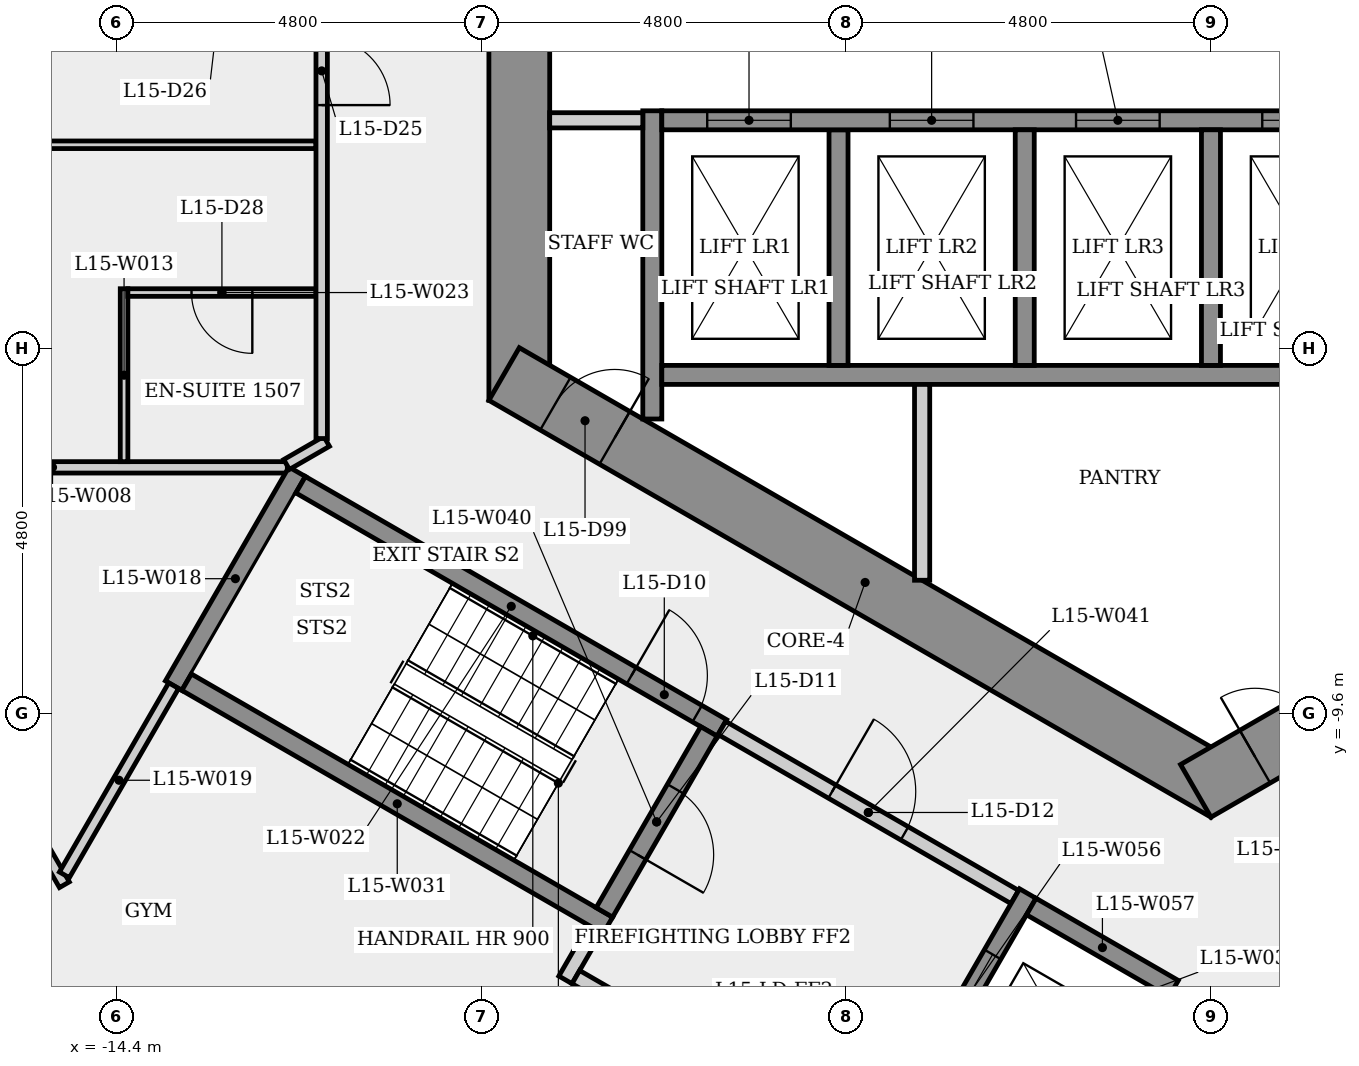
"""IFC4 building model, lengths in metres.
Left out: names, types, materials, properties, quantities, classifications, styles, units other than length and angle.
Written with IfcOpenShell. Run it as: python <this file> out.ifc"""

import sys

from ifc_helpers import new_model, si_unit, direction, frame, frame_2d, origin, place, context, subcontext, project, spatial, rectangle, extrude, element, fill, save


model = new_model("IFC4")
c1 = context("Model", 3, precision=1e-05, world=origin(), true_north=direction((0.0, 1.0)))
c2 = subcontext(c1, "Body", "Model", "MODEL_VIEW")
j1 = project(units=[si_unit("LENGTHUNIT", "METRE"), si_unit("PLANEANGLEUNIT", "RADIAN")], contexts=[c1])
p1 = place(None, origin())
s1 = spatial("IfcSite", under=j1, at=p1, CompositionType="ELEMENT")
p2 = place(p1, origin())
s2 = spatial("IfcBuilding", under=s1, at=p2, CompositionType="ELEMENT")
p3 = place(p2, frame((0.0, 0.0, 59.5)))
s3 = spatial("IfcBuildingStorey", under=s2, at=p3, CompositionType="ELEMENT", Elevation=59.5)
p4 = place(p3, frame((-9.1, 5.485, 0.0), z_axis=(0.0, 0.0, 1.0), x_axis=(0.0, -1.0, 0.0)))
e1 = element("IfcWall", 1, at=p4, inside=s3, PredefinedType="SHEAR", context=c2, shape_type="SweptSolid", body=[
    extrude(rectangle(XDim=10.97, YDim=0.8, at=frame_2d((5.485, 0.0))), origin(), (0.0, 0.0, 1.0), 3.4),
])
p5 = place(p4, frame((4.685, 0.0, 0.0)))
e2 = element("IfcOpeningElement", 2, at=p5, cuts=e1, PredefinedType="OPENING", context=c2, shape_type="SweptSolid", body=[
    extrude(rectangle(XDim=1.6, YDim=2.1, at=frame_2d((0.8, 1.05))), frame((0.0, 0.41, 0.0), z_axis=(0.0, -1.0, 0.0), x_axis=(1.0, 0.0, 0.0)), (0.0, 0.0, 1.0), 0.82),
])
p6 = place(p3, frame((-9.3, -5.138, 0.0), z_axis=(0.0, 0.0, 1.0), x_axis=(0.866023993627, -0.500002442456, 0.0)))
e3 = element("IfcWall", 3, at=p6, inside=s3, PredefinedType="SHEAR", context=c2, shape_type="SweptSolid", body=[
    extrude(rectangle(XDim=10.97, YDim=0.8, at=frame_2d((5.485, 0.0))), origin(), (0.0, 0.0, 1.0), 3.4),
])
p7 = place(p6, frame((0.78, 0.0, 0.0)))
e4 = element("IfcOpeningElement", 4, at=p7, cuts=e3, PredefinedType="OPENING", context=c2, shape_type="SweptSolid", body=[
    extrude(rectangle(XDim=0.9, YDim=2.1, at=frame_2d((0.45, 1.05))), frame((0.0, 0.41, 0.0), z_axis=(0.0, -1.0, 0.0), x_axis=(1.0, 0.0, 0.0)), (0.0, 0.0, 1.0), 0.82),
])
p8 = place(p3, frame((-0.2, -10.623, 0.0), z_axis=(0.0, 0.0, 1.0), x_axis=(0.866023993627, 0.500002442456, 0.0)))
e5 = element("IfcWall", 5, at=p8, inside=s3, PredefinedType="SHEAR", context=c2, shape_type="SweptSolid", body=[
    extrude(rectangle(XDim=10.97, YDim=0.8, at=frame_2d((5.485, 0.0))), origin(), (0.0, 0.0, 1.0), 3.4),
])
p9 = place(p8, frame((0.9, 0.0, 0.0)))
e6 = element("IfcOpeningElement", 6, at=p9, cuts=e5, PredefinedType="OPENING", context=c2, shape_type="SweptSolid", body=[
    extrude(rectangle(XDim=0.9, YDim=2.1, at=frame_2d((0.45, 1.05))), frame((0.0, 0.41, 0.0), z_axis=(0.0, -1.0, 0.0), x_axis=(1.0, 0.0, 0.0)), (0.0, 0.0, 1.0), 0.82),
])
p10 = place(p8, frame((7.455, 0.0, 0.0)))
e7 = element("IfcOpeningElement", 7, at=p10, cuts=e5, PredefinedType="OPENING", context=c2, shape_type="SweptSolid", body=[
    extrude(rectangle(XDim=0.9, YDim=2.1, at=frame_2d((0.45, 1.05))), frame((0.0, 0.41, 0.0), z_axis=(0.0, -1.0, 0.0), x_axis=(1.0, 0.0, 0.0)), (0.0, 0.0, 1.0), 0.82),
])
p11 = place(p3, frame((-18.331, -6.366, 0.0), z_axis=(0.0, 0.0, 1.0), x_axis=(1.0, 0.0, 0.0)))
e8 = element("IfcWall", 8, at=p11, inside=s3, PredefinedType="PARTITIONING", context=c2, shape_type="SweptSolid", body=[
    extrude(rectangle(XDim=6.179, YDim=0.15, at=frame_2d((3.089, 0.0))), origin(), (0.0, 0.0, 1.0), 3.05),
])
p12 = place(p11, frame((1.605, 0.0, 0.0)))
e9 = element("IfcOpeningElement", 9, at=p12, cuts=e8, PredefinedType="OPENING", context=c2, shape_type="SweptSolid", body=[
    extrude(rectangle(XDim=0.9, YDim=2.1, at=frame_2d((0.45, 1.05))), frame((0.0, 0.085, 0.0), z_axis=(0.0, -1.0, 0.0), x_axis=(1.0, 0.0, 0.0)), (0.0, 0.0, 1.0), 0.17),
])
p13 = place(p3, frame((-15.085, -11.858, 0.0), z_axis=(0.0, 0.0, 1.0), x_axis=(-0.500019233215, 0.866014299198, 0.0)))
e10 = element("IfcWall", 10, at=p13, inside=s3, PredefinedType="PARTITIONING", context=c2, shape_type="SweptSolid", body=[
    extrude(rectangle(XDim=6.266, YDim=0.15, at=frame_2d((3.133, 0.0))), origin(), (0.0, 0.0, 1.0), 3.05),
])
p14 = place(p13, frame((2.671, 0.0, 0.0)))
e11 = element("IfcOpeningElement", 11, at=p14, cuts=e10, PredefinedType="OPENING", context=c2, shape_type="SweptSolid", body=[
    extrude(rectangle(XDim=1.0, YDim=2.1, at=frame_2d((0.5, 1.05))), frame((0.0, 0.085, 0.0), z_axis=(0.0, -1.0, 0.0), x_axis=(1.0, 0.0, 0.0)), (0.0, 0.0, 1.0), 0.17),
])
p15 = place(p3, frame((-14.3, -4.016, 0.0), z_axis=(0.0, 0.0, 1.0), x_axis=(0.0, -1.0, 0.0)))
e12 = element("IfcWall", 12, at=p15, inside=s3, PredefinedType="PARTITIONING", context=c2, shape_type="SweptSolid", body=[
    extrude(rectangle(XDim=2.275, YDim=0.1, at=frame_2d((1.138, 0.0))), origin(), (0.0, 0.0, 1.0), 3.05),
])
p16 = place(p3, frame((-13.648, -9.239, 0.0), z_axis=(0.0, 0.0, 1.0), x_axis=(0.500017246033, 0.866015446554, 0.0)))
e13 = element("IfcWall", 13, at=p16, inside=s3, PredefinedType="SHEAR", context=c2, shape_type="SweptSolid", body=[
    extrude(rectangle(XDim=3.25, YDim=0.25, at=frame_2d((1.625, 0.0))), origin(), (0.0, 0.0, 1.0), 3.05),
])
p17 = place(p3, frame((-13.648, -9.239, 0.0), z_axis=(0.0, 0.0, 1.0), x_axis=(-0.500048363171, -0.865997479494, 0.0)))
e14 = element("IfcWall", 14, at=p17, inside=s3, PredefinedType="PARTITIONING", context=c2, shape_type="SweptSolid", body=[
    extrude(rectangle(XDim=2.875, YDim=0.15, at=frame_2d((1.438, 0.0))), origin(), (0.0, 0.0, 1.0), 3.05),
])
p18 = place(p3, frame((-12.162, -6.329, 0.0), z_axis=(0.0, 0.0, 1.0), x_axis=(0.866011828767, 0.500023511883, 0.0)))
e15 = element("IfcWall", 15, at=p18, inside=s3, PredefinedType="PARTITIONING", context=c2, shape_type="SweptSolid", body=[
    extrude(rectangle(XDim=0.608, YDim=0.15, at=frame_2d((0.304, 0.0))), origin(), (0.0, 0.0, 1.0), 3.05),
])
p19 = place(p3, frame((-11.977, -6.595, 0.0), z_axis=(0.0, 0.0, 1.0), x_axis=(0.866025499775, -0.499999833739, 0.0)))
e16 = element("IfcWall", 16, at=p19, inside=s3, PredefinedType="SHEAR", context=c2, shape_type="SweptSolid", body=[
    extrude(rectangle(XDim=6.4, YDim=0.25, at=frame_2d((3.2, 0.0))), origin(), (0.0, 0.0, 1.0), 3.05),
])
p20 = place(p19, frame((5.025, 0.0, 0.0)))
e17 = element("IfcOpeningElement", 17, at=p20, cuts=e16, PredefinedType="OPENING", context=c2, shape_type="SweptSolid", body=[
    extrude(rectangle(XDim=1.0, YDim=2.1, at=frame_2d((0.5, 1.05))), frame((0.0, 0.135, 0.0), z_axis=(0.0, -1.0, 0.0), x_axis=(1.0, 0.0, 0.0)), (0.0, 0.0, 1.0), 0.27),
])
p21 = place(p3, frame((-11.775, -4.066, 0.0), z_axis=(0.0, 0.0, 1.0), x_axis=(-1.0, 0.0, 0.0)))
e18 = element("IfcWall", 18, at=p21, inside=s3, PredefinedType="PARTITIONING", context=c2, shape_type="SweptSolid", body=[
    extrude(rectangle(XDim=2.475, YDim=0.1, at=frame_2d((1.238, 0.0))), origin(), (0.0, 0.0, 1.0), 3.05),
])
p22 = place(p21, frame((0.837, 0.0, 0.0)))
e19 = element("IfcOpeningElement", 19, at=p22, cuts=e18, PredefinedType="OPENING", context=c2, shape_type="SweptSolid", body=[
    extrude(rectangle(XDim=0.8, YDim=2.1, at=frame_2d((0.4, 1.05))), frame((0.0, 0.06, 0.0), z_axis=(0.0, -1.0, 0.0), x_axis=(1.0, 0.0, 0.0)), (0.0, 0.0, 1.0), 0.12),
])
p23 = place(p3, frame((-11.775, -2.122, 0.0), z_axis=(0.0, 0.0, 1.0), x_axis=(-1.0, 0.0, 0.0)))
e20 = element("IfcWall", 20, at=p23, inside=s3, PredefinedType="PARTITIONING", context=c2, shape_type="SweptSolid", body=[
    extrude(rectangle(XDim=8.416, YDim=0.1, at=frame_2d((4.208, 0.0))), origin(), (0.0, 0.0, 1.0), 3.05),
])
p24 = place(p3, frame((-11.7, 6.137, 0.0), z_axis=(0.0, 0.0, 1.0), x_axis=(0.0, -1.0, 0.0)))
e21 = element("IfcWall", 21, at=p24, inside=s3, PredefinedType="PARTITIONING", context=c2, shape_type="SweptSolid", body=[
    extrude(rectangle(XDim=12.125, YDim=0.15, at=frame_2d((6.062, 0.0))), origin(), (0.0, 0.0, 1.0), 3.05),
])
p25 = place(p24, frame((6.837, 0.0, 0.0)))
e22 = element("IfcOpeningElement", 22, at=p25, cuts=e21, PredefinedType="OPENING", context=c2, shape_type="SweptSolid", body=[
    extrude(rectangle(XDim=0.9, YDim=2.1, at=frame_2d((0.45, 1.05))), frame((0.0, 0.085, 0.0), z_axis=(0.0, -1.0, 0.0), x_axis=(1.0, 0.0, 0.0)), (0.0, 0.0, 1.0), 0.17),
])
p26 = place(p3, frame((-8.493, -13.11, 0.0), z_axis=(0.0, 0.0, 1.0), x_axis=(0.500067724834, 0.865986299303, 0.0)))
e23 = element("IfcWall", 23, at=p26, inside=s3, PredefinedType="PARTITIONING", context=c2, shape_type="SweptSolid", body=[
    extrude(rectangle(XDim=0.775, YDim=0.2, at=frame_2d((0.388, 0.0))), origin(), (0.0, 0.0, 1.0), 3.05),
])
p27 = place(p3, frame((-7.935, -12.393, 0.0), z_axis=(0.0, 0.0, 1.0), x_axis=(-0.866025499775, 0.499999833739, 0.0)))
e24 = element("IfcWall", 24, at=p27, inside=s3, PredefinedType="SHEAR", context=c2, shape_type="SweptSolid", body=[
    extrude(rectangle(XDim=6.4, YDim=0.25, at=frame_2d((3.2, 0.0))), origin(), (0.0, 0.0, 1.0), 3.05),
])
p28 = place(p3, frame((-8.356, -13.073, 0.0), z_axis=(0.0, 0.0, 1.0), x_axis=(0.866038532462, -0.499977259774, 0.0)))
e25 = element("IfcWall", 25, at=p28, inside=s3, PredefinedType="PARTITIONING", context=c2, shape_type="SweptSolid", body=[
    extrude(rectangle(XDim=4.7, YDim=0.2, at=frame_2d((2.35, 0.0))), origin(), (0.0, 0.0, 1.0), 3.05),
])
p29 = place(p3, frame((-7.35, -5.73, 0.0), z_axis=(0.0, 0.0, 1.0), x_axis=(0.0, 1.0, 0.0)))
e26 = element("IfcWall", 26, at=p29, inside=s3, PredefinedType="SHEAR", context=c2, shape_type="SweptSolid", body=[
    extrude(rectangle(XDim=4.055, YDim=0.25, at=frame_2d((2.028, 0.0))), origin(), (0.0, 0.0, 1.0), 3.05),
])
p30 = place(p3, frame((-7.475, -1.8, 0.0), z_axis=(0.0, 0.0, 1.0), x_axis=(-1.0, 0.0, 0.0)))
e27 = element("IfcWall", 27, at=p30, inside=s3, PredefinedType="PARTITIONING", context=c2, shape_type="SweptSolid", body=[
    extrude(rectangle(XDim=1.225, YDim=0.2, at=frame_2d((0.613, 0.0))), origin(), (0.0, 0.0, 1.0), 3.05),
])
p31 = place(p3, frame((-6.605, -9.841, 0.0), z_axis=(0.0, 0.0, 1.0), x_axis=(-0.499996545922, -0.866027397988, 0.0)))
e28 = element("IfcWall", 28, at=p31, inside=s3, PredefinedType="SHEAR", context=c2, shape_type="SweptSolid", body=[
    extrude(rectangle(XDim=2.75, YDim=0.25, at=frame_2d((1.375, 0.0))), origin(), (0.0, 0.0, 1.0), 3.05),
])
p32 = place(p31, frame((0.875, 0.0, 0.0)))
e29 = element("IfcOpeningElement", 29, at=p32, cuts=e28, PredefinedType="OPENING", context=c2, shape_type="SweptSolid", body=[
    extrude(rectangle(XDim=1.0, YDim=2.1, at=frame_2d((0.5, 1.05))), frame((0.0, 0.135, 0.0), z_axis=(0.0, -1.0, 0.0), x_axis=(1.0, 0.0, 0.0)), (0.0, 0.0, 1.0), 0.27),
])
p33 = place(p3, frame((-6.435, -9.795, 0.0), z_axis=(0.0, 0.0, 1.0), x_axis=(0.866012907634, -0.500021643343, 0.0)))
e30 = element("IfcWall", 30, at=p33, inside=s3, PredefinedType="PARTITIONING", context=c2, shape_type="SweptSolid", body=[
    extrude(rectangle(XDim=4.45, YDim=0.2, at=frame_2d((2.225, 0.0))), origin(), (0.0, 0.0, 1.0), 3.05),
])
p34 = place(p33, frame((1.675, 0.0, 0.0)))
e31 = element("IfcOpeningElement", 31, at=p34, cuts=e30, PredefinedType="OPENING", context=c2, shape_type="SweptSolid", body=[
    extrude(rectangle(XDim=1.1, YDim=2.1, at=frame_2d((0.55, 1.05))), frame((0.0, 0.11, 0.0), z_axis=(0.0, -1.0, 0.0), x_axis=(1.0, 0.0, 0.0)), (0.0, 0.0, 1.0), 0.22),
])
p35 = place(p3, frame((-7.225, -5.15, 0.0), z_axis=(0.0, 0.0, 1.0), x_axis=(1.0, 0.0, 0.0)))
e32 = element("IfcWall", 32, at=p35, inside=s3, PredefinedType="SHEAR", context=c2, shape_type="SweptSolid", body=[
    extrude(rectangle(XDim=14.7, YDim=0.25, at=frame_2d((7.35, 0.0))), origin(), (0.0, 0.0, 1.0), 3.05),
])
p36 = place(p3, frame((-4.9, -1.925, 0.0), z_axis=(0.0, 0.0, 1.0), x_axis=(0.0, -1.0, 0.0)))
e33 = element("IfcWall", 33, at=p36, inside=s3, PredefinedType="SHEAR", context=c2, shape_type="SweptSolid", body=[
    extrude(rectangle(XDim=3.1, YDim=0.25, at=frame_2d((1.55, 0.0))), origin(), (0.0, 0.0, 1.0), 3.4),
])
p37 = place(p3, frame((-7.225, -1.8, 0.0), z_axis=(0.0, 0.0, 1.0), x_axis=(1.0, 0.0, 0.0)))
e34 = element("IfcWall", 34, at=p37, inside=s3, PredefinedType="SHEAR", context=c2, shape_type="SweptSolid", body=[
    extrude(rectangle(XDim=14.7, YDim=0.25, at=frame_2d((7.35, 0.0))), origin(), (0.0, 0.0, 1.0), 3.05),
])
p38 = place(p37, frame((0.597, 0.0, 0.0)))
e35 = element("IfcOpeningElement", 35, at=p38, cuts=e34, PredefinedType="OPENING", context=c2, shape_type="SweptSolid", body=[
    extrude(rectangle(XDim=1.1, YDim=2.1, at=frame_2d((0.55, 1.05))), frame((0.0, 0.135, 0.0), z_axis=(0.0, -1.0, 0.0), x_axis=(1.0, 0.0, 0.0)), (0.0, 0.0, 1.0), 0.27),
])
p39 = place(p37, frame((3.0, 0.0, 0.0)))
e36 = element("IfcOpeningElement", 36, at=p39, cuts=e34, PredefinedType="OPENING", context=c2, shape_type="SweptSolid", body=[
    extrude(rectangle(XDim=1.1, YDim=2.1, at=frame_2d((0.55, 1.05))), frame((0.0, 0.135, 0.0), z_axis=(0.0, -1.0, 0.0), x_axis=(1.0, 0.0, 0.0)), (0.0, 0.0, 1.0), 0.27),
])
p40 = place(p37, frame((5.45, 0.0, 0.0)))
e37 = element("IfcOpeningElement", 37, at=p40, cuts=e34, PredefinedType="OPENING", context=c2, shape_type="SweptSolid", body=[
    extrude(rectangle(XDim=1.1, YDim=2.1, at=frame_2d((0.55, 1.05))), frame((0.0, 0.135, 0.0), z_axis=(0.0, -1.0, 0.0), x_axis=(1.0, 0.0, 0.0)), (0.0, 0.0, 1.0), 0.27),
])
p41 = place(p37, frame((7.9, 0.0, 0.0)))
e38 = element("IfcOpeningElement", 38, at=p41, cuts=e34, PredefinedType="OPENING", context=c2, shape_type="SweptSolid", body=[
    extrude(rectangle(XDim=1.1, YDim=2.1, at=frame_2d((0.55, 1.05))), frame((0.0, 0.135, 0.0), z_axis=(0.0, -1.0, 0.0), x_axis=(1.0, 0.0, 0.0)), (0.0, 0.0, 1.0), 0.27),
])
p42 = place(p37, frame((10.35, 0.0, 0.0)))
e39 = element("IfcOpeningElement", 39, at=p42, cuts=e34, PredefinedType="OPENING", context=c2, shape_type="SweptSolid", body=[
    extrude(rectangle(XDim=1.1, YDim=2.1, at=frame_2d((0.55, 1.05))), frame((0.0, 0.135, 0.0), z_axis=(0.0, -1.0, 0.0), x_axis=(1.0, 0.0, 0.0)), (0.0, 0.0, 1.0), 0.27),
])
p43 = place(p3, frame((-3.8, -5.275, 0.0), z_axis=(0.0, 0.0, 1.0), x_axis=(0.0, -1.0, 0.0)))
e40 = element("IfcWall", 40, at=p43, inside=s3, PredefinedType="PARTITIONING", context=c2, shape_type="SweptSolid", body=[
    extrude(rectangle(XDim=2.577, YDim=0.2, at=frame_2d((1.289, 0.0))), origin(), (0.0, 0.0, 1.0), 3.05),
])
p44 = place(p3, frame((-2.41, -11.974, 0.0), z_axis=(0.0, 0.0, 1.0), x_axis=(-0.500001826776, -0.866024349092, 0.0)))
e41 = element("IfcWall", 41, at=p44, inside=s3, PredefinedType="SHEAR", context=c2, shape_type="SweptSolid", body=[
    extrude(rectangle(XDim=2.95, YDim=0.25, at=frame_2d((1.475, 0.0))), origin(), (0.0, 0.0, 1.0), 3.05),
])
p45 = place(p44, frame((0.925, 0.0, 0.0)))
e42 = element("IfcOpeningElement", 42, at=p45, cuts=e41, PredefinedType="OPENING", context=c2, shape_type="SweptSolid", body=[
    extrude(rectangle(XDim=1.1, YDim=2.1, at=frame_2d((0.55, 1.05))), frame((0.0, 0.135, 0.0), z_axis=(0.0, -1.0, 0.0), x_axis=(1.0, 0.0, 0.0)), (0.0, 0.0, 1.0), 0.27),
])
p46 = place(p3, frame((-2.364, -12.145, 0.0), z_axis=(0.0, 0.0, 1.0), x_axis=(0.86603892542, -0.499976579108, 0.0)))
e43 = element("IfcWall", 43, at=p46, inside=s3, PredefinedType="SHEAR", context=c2, shape_type="SweptSolid", body=[
    extrude(rectangle(XDim=2.162, YDim=0.25, at=frame_2d((1.081, 0.0))), origin(), (0.0, 0.0, 1.0), 3.05),
])
for number, where, z_axis, x_axis in (
    (44, (-2.45, -1.925, 0.0), (0.0, 0.0, 1.0), (0.0, -1.0, 0.0)),
    (45, (0.0, -1.925, 0.0), (0.0, 0.0, 1.0), (0.0, -1.0, 0.0)),
):
    element("IfcWall", number, at=place(p3, frame(where, z_axis=z_axis, x_axis=x_axis)), inside=s3, PredefinedType="SHEAR", context=c2, shape_type="SweptSolid", body=[
        extrude(rectangle(XDim=3.1, YDim=0.25, at=frame_2d((1.55, 0.0))), origin(), (0.0, 0.0, 1.0), 3.4),
    ])
p47 = place(p38, origin())
e46 = element("IfcDoor", 46, at=p47, inside=s3, OperationType="SLIDING_TO_LEFT", PredefinedType="DOOR", context=c2, shape_type="SweptSolid", body=[
    extrude(rectangle(XDim=1.1, YDim=2.1, at=frame_2d((0.55, 1.05))), frame((0.0, 0.025, 0.0), z_axis=(0.0, -1.0, 0.0), x_axis=(1.0, 0.0, 0.0)), (0.0, 0.0, 1.0), 0.05),
])
fill(e35, e46)
p48 = place(p39, origin())
e47 = element("IfcDoor", 47, at=p48, inside=s3, OperationType="SLIDING_TO_LEFT", PredefinedType="DOOR", context=c2, shape_type="SweptSolid", body=[
    extrude(rectangle(XDim=1.1, YDim=2.1, at=frame_2d((0.55, 1.05))), frame((0.0, 0.025, 0.0), z_axis=(0.0, -1.0, 0.0), x_axis=(1.0, 0.0, 0.0)), (0.0, 0.0, 1.0), 0.05),
])
fill(e36, e47)
p49 = place(p40, origin())
e48 = element("IfcDoor", 48, at=p49, inside=s3, OperationType="SLIDING_TO_LEFT", PredefinedType="DOOR", context=c2, shape_type="SweptSolid", body=[
    extrude(rectangle(XDim=1.1, YDim=2.1, at=frame_2d((0.55, 1.05))), frame((0.0, 0.025, 0.0), z_axis=(0.0, -1.0, 0.0), x_axis=(1.0, 0.0, 0.0)), (0.0, 0.0, 1.0), 0.05),
])
fill(e37, e48)
p50 = place(p41, origin())
e49 = element("IfcDoor", 49, at=p50, inside=s3, OperationType="SLIDING_TO_LEFT", PredefinedType="DOOR", context=c2, shape_type="SweptSolid", body=[
    extrude(rectangle(XDim=1.1, YDim=2.1, at=frame_2d((0.55, 1.05))), frame((0.0, 0.025, 0.0), z_axis=(0.0, -1.0, 0.0), x_axis=(1.0, 0.0, 0.0)), (0.0, 0.0, 1.0), 0.05),
])
fill(e38, e49)
p51 = place(p20, origin())
e50 = element("IfcDoor", 50, at=p51, inside=s3, OperationType="SINGLE_SWING_LEFT", PredefinedType="DOOR", context=c2, shape_type="SweptSolid", body=[
    extrude(rectangle(XDim=1.0, YDim=2.1, at=frame_2d((0.5, 1.05))), frame((0.0, 0.025, 0.0), z_axis=(0.0, -1.0, 0.0), x_axis=(1.0, 0.0, 0.0)), (0.0, 0.0, 1.0), 0.05),
])
fill(e17, e50)
p52 = place(p32, origin())
e51 = element("IfcDoor", 51, at=p52, inside=s3, OperationType="SINGLE_SWING_RIGHT", PredefinedType="DOOR", context=c2, shape_type="SweptSolid", body=[
    extrude(rectangle(XDim=1.0, YDim=2.1, at=frame_2d((0.5, 1.05))), frame((0.0, 0.025, 0.0), z_axis=(0.0, -1.0, 0.0), x_axis=(1.0, 0.0, 0.0)), (0.0, 0.0, 1.0), 0.05),
])
fill(e29, e51)
p53 = place(p34, origin())
e52 = element("IfcDoor", 52, at=p53, inside=s3, OperationType="SINGLE_SWING_LEFT", PredefinedType="DOOR", context=c2, shape_type="SweptSolid", body=[
    extrude(rectangle(XDim=1.1, YDim=2.1, at=frame_2d((0.55, 1.05))), frame((0.0, 0.025, 0.0), z_axis=(0.0, -1.0, 0.0), x_axis=(1.0, 0.0, 0.0)), (0.0, 0.0, 1.0), 0.05),
])
fill(e31, e52)
p54 = place(p45, origin())
e53 = element("IfcDoor", 53, at=p54, inside=s3, OperationType="SLIDING_TO_LEFT", PredefinedType="DOOR", context=c2, shape_type="SweptSolid", body=[
    extrude(rectangle(XDim=1.1, YDim=2.1, at=frame_2d((0.55, 1.05))), frame((0.0, 0.025, 0.0), z_axis=(0.0, -1.0, 0.0), x_axis=(1.0, 0.0, 0.0)), (0.0, 0.0, 1.0), 0.05),
])
fill(e42, e53)
p55 = place(p25, origin())
e54 = element("IfcDoor", 54, at=p55, inside=s3, OperationType="SINGLE_SWING_RIGHT", PredefinedType="DOOR", context=c2, shape_type="SweptSolid", body=[
    extrude(rectangle(XDim=0.9, YDim=2.1, at=frame_2d((0.45, 1.05))), frame((0.0, 0.025, 0.0), z_axis=(0.0, -1.0, 0.0), x_axis=(1.0, 0.0, 0.0)), (0.0, 0.0, 1.0), 0.05),
])
fill(e22, e54)
p56 = place(p22, origin())
e55 = element("IfcDoor", 55, at=p56, inside=s3, OperationType="SINGLE_SWING_LEFT", PredefinedType="DOOR", context=c2, shape_type="SweptSolid", body=[
    extrude(rectangle(XDim=0.8, YDim=2.1, at=frame_2d((0.4, 1.05))), frame((0.0, 0.025, 0.0), z_axis=(0.0, -1.0, 0.0), x_axis=(1.0, 0.0, 0.0)), (0.0, 0.0, 1.0), 0.05),
])
fill(e19, e55)
p57 = place(p7, origin())
e56 = element("IfcDoor", 56, at=p57, inside=s3, OperationType="SINGLE_SWING_RIGHT", PredefinedType="DOOR", context=c2, shape_type="SweptSolid", body=[
    extrude(rectangle(XDim=0.9, YDim=2.1, at=frame_2d((0.45, 1.05))), frame((0.0, 0.025, 0.0), z_axis=(0.0, -1.0, 0.0), x_axis=(1.0, 0.0, 0.0)), (0.0, 0.0, 1.0), 0.05),
])
fill(e4, e56)
p58 = place(p9, origin())
e57 = element("IfcDoor", 57, at=p58, inside=s3, OperationType="SINGLE_SWING_LEFT", PredefinedType="DOOR", context=c2, shape_type="SweptSolid", body=[
    extrude(rectangle(XDim=0.9, YDim=2.1, at=frame_2d((0.45, 1.05))), frame((0.0, 0.025, 0.0), z_axis=(0.0, -1.0, 0.0), x_axis=(1.0, 0.0, 0.0)), (0.0, 0.0, 1.0), 0.05),
])
fill(e6, e57)
save(model, sys.argv[1])
